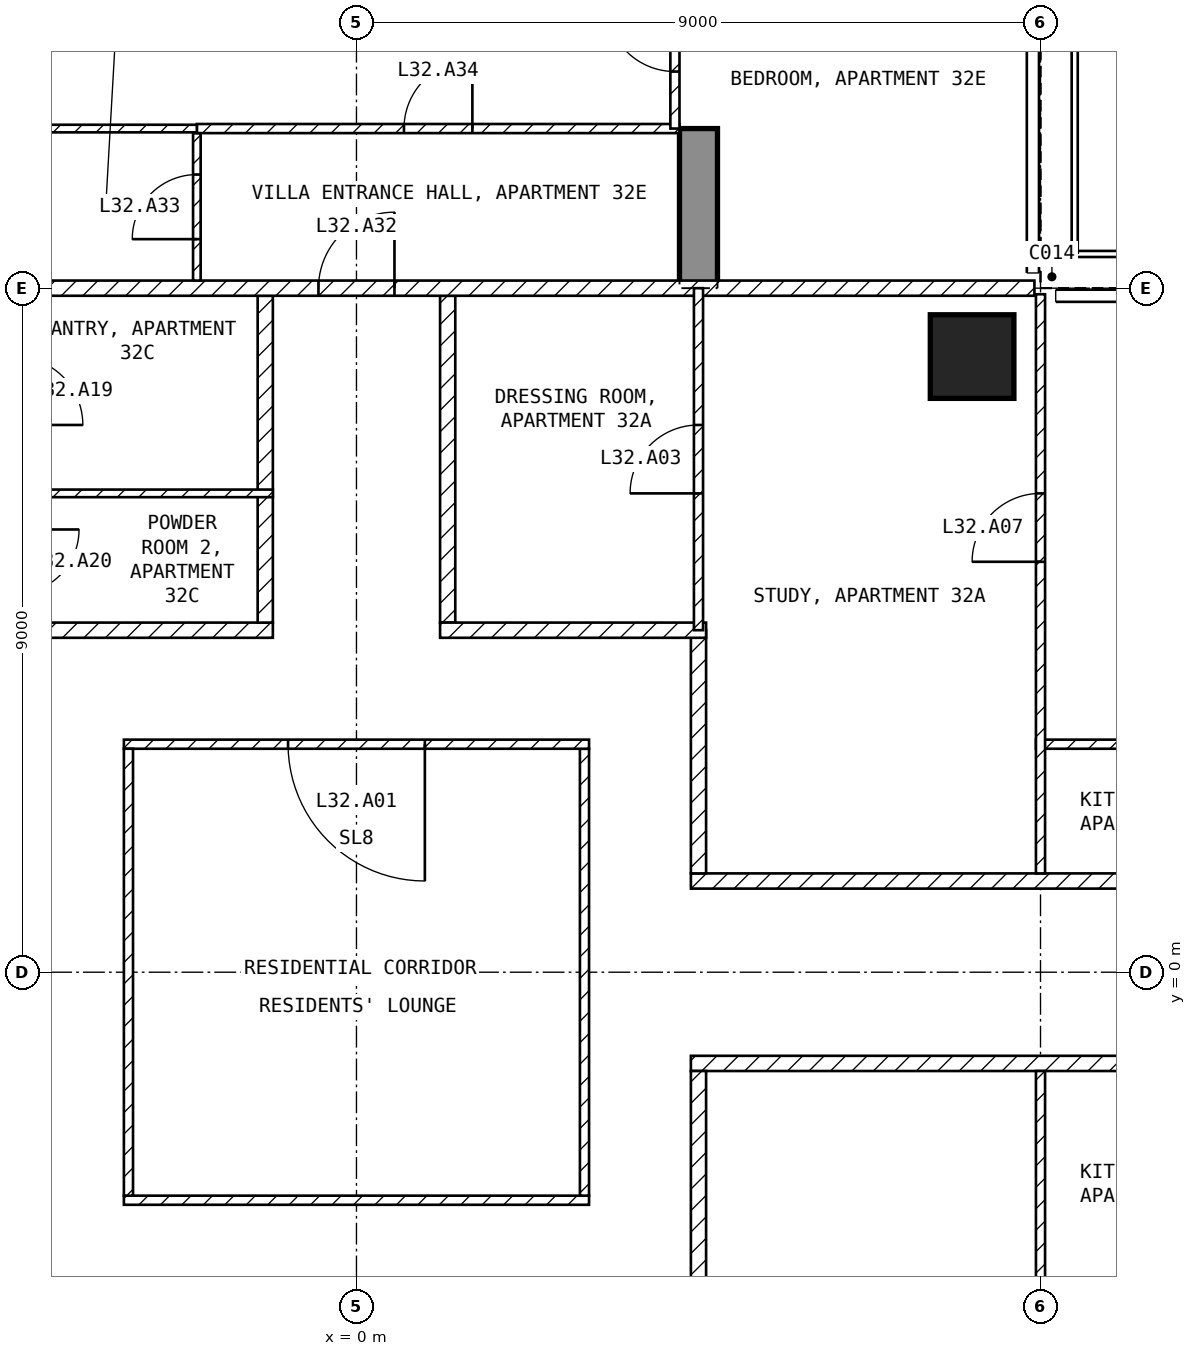
"""IFC4 building model, lengths in metres.
Left out: names, types, materials, properties, quantities, classifications, styles, units other than length and angle.
Written with IfcOpenShell. Run it as: python <this file> out.ifc"""

import sys

from ifc_helpers import new_model, si_unit, direction, frame, frame_2d, origin, origin_2d, place, context, subcontext, project, spatial, polyline, rectangle, outline, extrude, element, fill, save


model = new_model("IFC4")
c1 = context("Model", 3, precision=1e-05, world=origin(), true_north=direction((0.0, 1.0)))
c2 = subcontext(c1, "Body", "Model", "MODEL_VIEW")
j1 = project(units=[si_unit("LENGTHUNIT", "METRE"), si_unit("PLANEANGLEUNIT", "RADIAN")], contexts=[c1])
p1 = place(None, origin())
s1 = spatial("IfcSite", under=j1, at=p1, CompositionType="ELEMENT")
p2 = place(p1, origin())
s2 = spatial("IfcBuilding", under=s1, at=p2, CompositionType="ELEMENT")
p3 = place(p2, frame((0.0, 0.0, 133.9)))
s3 = spatial("IfcBuildingStorey", under=s2, at=p3, CompositionType="ELEMENT", Elevation=133.9)
p4 = place(p3, frame((8.1, 8.1, -0.25), z_axis=(0.0, 0.0, 1.0), x_axis=(1.0, 0.0, 0.0)))
e1 = element("IfcColumn", 1, at=p4, inside=s3, PredefinedType="COLUMN", context=c2, shape_type="SweptSolid", body=[
    extrude(rectangle(XDim=1.1, YDim=1.1, at=origin_2d()), origin(), (0.0, 0.0, 1.0), 3.5),
])
p5 = place(p3, frame((4.25, 9.0, -0.25), z_axis=(1.0, 0.0, 0.0), x_axis=(0.0, 1.0, 0.0)))
e2 = element("IfcWall", 2, at=p5, inside=s3, PredefinedType="SHEAR", context=c2, shape_type="SweptSolid", body=[
    extrude(outline(polyline([(0.0, 0.0), (2.1, 0.0), (2.1, 2.65), (4.5, 2.65), (4.5, 0.0), (9.9, 0.0), (9.9, 2.65), (12.3, 2.65), (12.3, 0.0), (16.55, 0.0), (16.55, 3.5), (0.0, 3.5), (0.0, 0.0)])), origin(), (0.0, 0.0, 1.0), 0.5),
])
p6 = place(p3, frame((-3.06, -3.0, 0.0), z_axis=(0.0, 0.0, 1.0), x_axis=(1.0, 0.0, 0.0)))
e3 = element("IfcWall", 3, at=p6, inside=s3, PredefinedType="PARTITIONING", context=c2, shape_type="SweptSolid", body=[
    extrude(rectangle(XDim=6.12, YDim=0.12, at=frame_2d((3.06, 0.0))), origin(), (0.0, 0.0, 1.0), 3.25),
])
p7 = place(p3, frame((3.0, -2.94, 0.0), z_axis=(0.0, 0.0, 1.0), x_axis=(0.0, 1.0, 0.0)))
e4 = element("IfcWall", 4, at=p7, inside=s3, PredefinedType="PARTITIONING", context=c2, shape_type="SweptSolid", body=[
    extrude(rectangle(XDim=5.88, YDim=0.12, at=frame_2d((2.94, 0.0))), origin(), (0.0, 0.0, 1.0), 3.25),
])
p8 = place(p3, frame((3.06, 3.0, 0.0), z_axis=(0.0, 0.0, 1.0), x_axis=(-1.0, 0.0, 0.0)))
e5 = element("IfcWall", 5, at=p8, inside=s3, PredefinedType="PARTITIONING", context=c2, shape_type="SweptSolid", body=[
    extrude(rectangle(XDim=6.12, YDim=0.12, at=frame_2d((3.06, 0.0))), origin(), (0.0, 0.0, 1.0), 3.25),
])
p9 = place(p8, frame((2.16, 0.0, 0.0)))
e6 = element("IfcOpeningElement", 6, at=p9, cuts=e5, PredefinedType="OPENING", context=c2, shape_type="SweptSolid", body=[
    extrude(rectangle(XDim=1.8, YDim=2.1, at=frame_2d((0.9, 1.05))), frame((0.0, 0.07, 0.0), z_axis=(0.0, -1.0, 0.0), x_axis=(1.0, 0.0, 0.0)), (0.0, 0.0, 1.0), 0.14),
])
p10 = place(p3, frame((-3.0, 2.94, 0.0), z_axis=(0.0, 0.0, 1.0), x_axis=(0.0, -1.0, 0.0)))
e7 = element("IfcWall", 7, at=p10, inside=s3, PredefinedType="PARTITIONING", context=c2, shape_type="SweptSolid", body=[
    extrude(rectangle(XDim=5.88, YDim=0.12, at=frame_2d((2.94, 0.0))), origin(), (0.0, 0.0, 1.0), 3.25),
])
p11 = place(p3, frame((4.4, 1.2, 0.0), z_axis=(0.0, 0.0, 1.0), x_axis=(1.0, 0.0, 0.0)))
e8 = element("IfcWall", 8, at=p11, inside=s3, PredefinedType="PARTITIONING", context=c2, shape_type="SweptSolid", body=[
    extrude(rectangle(XDim=17.2, YDim=0.2, at=frame_2d((8.6, 0.0))), origin(), (0.0, 0.0, 1.0), 3.25),
])
p12 = place(p11, frame((8.3, 0.0, 0.0)))
e9 = element("IfcOpeningElement", 9, at=p12, cuts=e8, PredefinedType="OPENING", context=c2, shape_type="SweptSolid", body=[
    extrude(rectangle(XDim=1.0, YDim=2.1, at=frame_2d((0.5, 1.05))), frame((0.0, 0.11, 0.0), z_axis=(0.0, -1.0, 0.0), x_axis=(1.0, 0.0, 0.0)), (0.0, 0.0, 1.0), 0.22),
])
p13 = place(p3, frame((4.5, 4.5, 0.0), z_axis=(0.0, 0.0, 1.0), x_axis=(0.0, -1.0, 0.0)))
e10 = element("IfcWall", 10, at=p13, inside=s3, PredefinedType="PARTITIONING", context=c2, shape_type="SweptSolid", body=[
    extrude(rectangle(XDim=3.2, YDim=0.2, at=frame_2d((1.6, 0.0))), origin(), (0.0, 0.0, 1.0), 3.25),
])
p14 = place(p3, frame((1.2, 8.9, 0.0), z_axis=(0.0, 0.0, 1.0), x_axis=(0.0, -1.0, 0.0)))
e11 = element("IfcWall", 11, at=p14, inside=s3, PredefinedType="PARTITIONING", context=c2, shape_type="SweptSolid", body=[
    extrude(rectangle(XDim=4.3, YDim=0.2, at=frame_2d((2.15, 0.0))), origin(), (0.0, 0.0, 1.0), 3.25),
])
p15 = place(p3, frame((1.1, 4.5, 0.0), z_axis=(0.0, 0.0, 1.0), x_axis=(1.0, 0.0, 0.0)))
e12 = element("IfcWall", 12, at=p15, inside=s3, PredefinedType="PARTITIONING", context=c2, shape_type="SweptSolid", body=[
    extrude(rectangle(XDim=3.5, YDim=0.2, at=frame_2d((1.75, 0.0))), origin(), (0.0, 0.0, 1.0), 3.25),
])
p16 = place(p3, frame((21.6, -1.2, 0.0), z_axis=(0.0, 0.0, 1.0), x_axis=(-1.0, 0.0, 0.0)))
e13 = element("IfcWall", 13, at=p16, inside=s3, PredefinedType="PARTITIONING", context=c2, shape_type="SweptSolid", body=[
    extrude(rectangle(XDim=17.2, YDim=0.2, at=frame_2d((8.6, 0.0))), origin(), (0.0, 0.0, 1.0), 3.25),
])
p17 = place(p16, frame((7.9, 0.0, 0.0)))
e14 = element("IfcOpeningElement", 14, at=p17, cuts=e13, PredefinedType="OPENING", context=c2, shape_type="SweptSolid", body=[
    extrude(rectangle(XDim=1.0, YDim=2.1, at=frame_2d((0.5, 1.05))), frame((0.0, 0.11, 0.0), z_axis=(0.0, -1.0, 0.0), x_axis=(1.0, 0.0, 0.0)), (0.0, 0.0, 1.0), 0.22),
])
p18 = place(p3, frame((4.5, -1.3, 0.0), z_axis=(0.0, 0.0, 1.0), x_axis=(0.0, -1.0, 0.0)))
e15 = element("IfcWall", 15, at=p18, inside=s3, PredefinedType="PARTITIONING", context=c2, shape_type="SweptSolid", body=[
    extrude(rectangle(XDim=3.2, YDim=0.2, at=frame_2d((1.6, 0.0))), origin(), (0.0, 0.0, 1.0), 3.25),
])
p19 = place(p3, frame((-4.6, 4.5, 0.0), z_axis=(0.0, 0.0, 1.0), x_axis=(1.0, 0.0, 0.0)))
e16 = element("IfcWall", 16, at=p19, inside=s3, PredefinedType="PARTITIONING", context=c2, shape_type="SweptSolid", body=[
    extrude(rectangle(XDim=3.5, YDim=0.2, at=frame_2d((1.75, 0.0))), origin(), (0.0, 0.0, 1.0), 3.25),
])
p20 = place(p3, frame((-1.2, 4.6, 0.0), z_axis=(0.0, 0.0, 1.0), x_axis=(0.0, 1.0, 0.0)))
e17 = element("IfcWall", 17, at=p20, inside=s3, PredefinedType="PARTITIONING", context=c2, shape_type="SweptSolid", body=[
    extrude(rectangle(XDim=4.3, YDim=0.2, at=frame_2d((2.15, 0.0))), origin(), (0.0, 0.0, 1.0), 3.25),
])
p21 = place(p3, frame((-8.92, 9.0, 0.0), z_axis=(0.0, 0.0, 1.0), x_axis=(1.0, 0.0, 0.0)))
e18 = element("IfcWall", 18, at=p21, inside=s3, PredefinedType="PARTITIONING", context=c2, shape_type="SweptSolid", body=[
    extrude(rectangle(XDim=17.84, YDim=0.2, at=frame_2d((8.92, 0.0))), origin(), (0.0, 0.0, 1.0), 3.25),
])
p22 = place(p21, frame((8.42, 0.0, 0.0)))
e19 = element("IfcOpeningElement", 19, at=p22, cuts=e18, PredefinedType="OPENING", context=c2, shape_type="SweptSolid", body=[
    extrude(rectangle(XDim=1.0, YDim=2.1, at=frame_2d((0.5, 1.05))), frame((0.0, 0.11, 0.0), z_axis=(0.0, -1.0, 0.0), x_axis=(1.0, 0.0, 0.0)), (0.0, 0.0, 1.0), 0.22),
])
p23 = place(p3, frame((8.94, 3.0, 0.0), z_axis=(0.0, 0.0, 1.0), x_axis=(1.0, 0.0, 0.0)))
e20 = element("IfcWall", 20, at=p23, inside=s3, PredefinedType="PARTITIONING", context=c2, shape_type="SweptSolid", body=[
    extrude(rectangle(XDim=7.86, YDim=0.12, at=frame_2d((3.93, 0.0))), origin(), (0.0, 0.0, 1.0), 3.25),
])
p24 = place(p23, frame((3.81, 0.0, 0.0)))
e21 = element("IfcOpeningElement", 21, at=p24, cuts=e20, PredefinedType="OPENING", context=c2, shape_type="SweptSolid", body=[
    extrude(rectangle(XDim=0.9, YDim=2.1, at=frame_2d((0.45, 1.05))), frame((0.0, 0.07, 0.0), z_axis=(0.0, -1.0, 0.0), x_axis=(1.0, 0.0, 0.0)), (0.0, 0.0, 1.0), 0.14),
])
p25 = place(p3, frame((9.0, 1.3, 0.0), z_axis=(0.0, 0.0, 1.0), x_axis=(0.0, 1.0, 0.0)))
e22 = element("IfcWall", 22, at=p25, inside=s3, PredefinedType="PARTITIONING", context=c2, shape_type="SweptSolid", body=[
    extrude(rectangle(XDim=7.62, YDim=0.12, at=frame_2d((3.81, 0.0))), origin(), (0.0, 0.0, 1.0), 3.25),
])
p26 = place(p25, frame((4.1, 0.0, 0.0)))
e23 = element("IfcOpeningElement", 23, at=p26, cuts=e22, PredefinedType="OPENING", context=c2, shape_type="SweptSolid", body=[
    extrude(rectangle(XDim=0.9, YDim=2.1, at=frame_2d((0.45, 1.05))), frame((0.0, 0.07, 0.0), z_axis=(0.0, -1.0, 0.0), x_axis=(1.0, 0.0, 0.0)), (0.0, 0.0, 1.0), 0.14),
])
p27 = place(p3, frame((4.5, 4.5, 0.0), z_axis=(0.0, 0.0, 1.0), x_axis=(0.0, 1.0, 0.0)))
e24 = element("IfcWall", 24, at=p27, inside=s3, PredefinedType="PARTITIONING", context=c2, shape_type="SweptSolid", body=[
    extrude(rectangle(XDim=4.5, YDim=0.12, at=frame_2d((2.25, 0.0))), origin(), (0.0, 0.0, 1.0), 3.25),
])
p28 = place(p27, frame((1.8, 0.0, 0.0)))
e25 = element("IfcOpeningElement", 25, at=p28, cuts=e24, PredefinedType="OPENING", context=c2, shape_type="SweptSolid", body=[
    extrude(rectangle(XDim=0.9, YDim=2.1, at=frame_2d((0.45, 1.05))), frame((0.0, 0.07, 0.0), z_axis=(0.0, -1.0, 0.0), x_axis=(1.0, 0.0, 0.0)), (0.0, 0.0, 1.0), 0.14),
])
p29 = place(p3, frame((9.0, -8.92, 0.0), z_axis=(0.0, 0.0, 1.0), x_axis=(0.0, 1.0, 0.0)))
e26 = element("IfcWall", 26, at=p29, inside=s3, PredefinedType="PARTITIONING", context=c2, shape_type="SweptSolid", body=[
    extrude(rectangle(XDim=7.62, YDim=0.12, at=frame_2d((3.81, 0.0))), origin(), (0.0, 0.0, 1.0), 3.25),
])
p30 = place(p29, frame((2.52, 0.0, 0.0)))
e27 = element("IfcOpeningElement", 27, at=p30, cuts=e26, PredefinedType="OPENING", context=c2, shape_type="SweptSolid", body=[
    extrude(rectangle(XDim=0.9, YDim=2.1, at=frame_2d((0.45, 1.05))), frame((0.0, 0.07, 0.0), z_axis=(0.0, -1.0, 0.0), x_axis=(1.0, 0.0, 0.0)), (0.0, 0.0, 1.0), 0.14),
])
p31 = place(p3, frame((-4.56, 6.3, 0.0), z_axis=(0.0, 0.0, 1.0), x_axis=(1.0, 0.0, 0.0)))
e28 = element("IfcWall", 28, at=p31, inside=s3, PredefinedType="PARTITIONING", context=c2, shape_type="SweptSolid", body=[
    extrude(rectangle(XDim=3.46, YDim=0.1, at=frame_2d((1.73, 0.0))), origin(), (0.0, 0.0, 1.0), 3.25),
])
p32 = place(p3, frame((-2.1, 9.1, 0.0), z_axis=(0.0, 0.0, 1.0), x_axis=(0.0, 1.0, 0.0)))
e29 = element("IfcWall", 29, at=p32, inside=s3, PredefinedType="PARTITIONING", context=c2, shape_type="SweptSolid", body=[
    extrude(rectangle(XDim=1.94, YDim=0.1, at=frame_2d((0.97, 0.0))), origin(), (0.0, 0.0, 1.0), 3.25),
])
p33 = place(p32, frame((0.545, 0.0, 0.0)))
e30 = element("IfcOpeningElement", 30, at=p33, cuts=e29, PredefinedType="OPENING", context=c2, shape_type="SweptSolid", body=[
    extrude(rectangle(XDim=0.85, YDim=2.1, at=frame_2d((0.425, 1.05))), frame((0.0, 0.06, 0.0), z_axis=(0.0, -1.0, 0.0), x_axis=(1.0, 0.0, 0.0)), (0.0, 0.0, 1.0), 0.12),
])
p34 = place(p3, frame((-2.1, 11.1, 0.0), z_axis=(0.0, 0.0, 1.0), x_axis=(1.0, 0.0, 0.0)))
e31 = element("IfcWall", 31, at=p34, inside=s3, PredefinedType="PARTITIONING", context=c2, shape_type="SweptSolid", body=[
    extrude(rectangle(XDim=6.35, YDim=0.12, at=frame_2d((3.175, 0.0))), origin(), (0.0, 0.0, 1.0), 3.25),
])
p35 = place(p34, frame((2.725, 0.0, 0.0)))
e32 = element("IfcOpeningElement", 32, at=p35, cuts=e31, PredefinedType="OPENING", context=c2, shape_type="SweptSolid", body=[
    extrude(rectangle(XDim=0.9, YDim=2.1, at=frame_2d((0.45, 1.05))), frame((0.0, 0.07, 0.0), z_axis=(0.0, -1.0, 0.0), x_axis=(1.0, 0.0, 0.0)), (0.0, 0.0, 1.0), 0.14),
])
p36 = place(p3, frame((-4.25, 11.1, 0.0), z_axis=(0.0, 0.0, 1.0), x_axis=(1.0, 0.0, 0.0)))
e33 = element("IfcWall", 33, at=p36, inside=s3, PredefinedType="PARTITIONING", context=c2, shape_type="SweptSolid", body=[
    extrude(rectangle(XDim=2.15, YDim=0.1, at=frame_2d((1.075, 0.0))), origin(), (0.0, 0.0, 1.0), 3.25),
])
p37 = place(p3, frame((4.19, 11.1, 0.0), z_axis=(0.0, 0.0, 1.0), x_axis=(0.0, 1.0, 0.0)))
e34 = element("IfcWall", 34, at=p37, inside=s3, PredefinedType="PARTITIONING", context=c2, shape_type="SweptSolid", body=[
    extrude(rectangle(XDim=2.4, YDim=0.12, at=frame_2d((1.2, 0.0))), origin(), (0.0, 0.0, 1.0), 2.4),
])
p38 = place(p37, frame((0.75, 0.0, 0.0)))
e35 = element("IfcOpeningElement", 35, at=p38, cuts=e34, PredefinedType="OPENING", context=c2, shape_type="SweptSolid", body=[
    extrude(rectangle(XDim=0.9, YDim=2.1, at=frame_2d((0.45, 1.05))), frame((0.0, 0.07, 0.0), z_axis=(0.0, -1.0, 0.0), x_axis=(1.0, 0.0, 0.0)), (0.0, 0.0, 1.0), 0.14),
])
p39 = place(p9, origin())
e36 = element("IfcDoor", 36, at=p39, inside=s3, OperationType="SINGLE_SWING_LEFT", PredefinedType="DOOR", context=c2, shape_type="SweptSolid", body=[
    extrude(rectangle(XDim=1.8, YDim=2.1, at=frame_2d((0.9, 1.05))), frame((0.0, 0.025, 0.0), z_axis=(0.0, -1.0, 0.0), x_axis=(1.0, 0.0, 0.0)), (0.0, 0.0, 1.0), 0.05),
])
fill(e6, e36)
p40 = place(p28, origin())
e37 = element("IfcDoor", 37, at=p40, inside=s3, OperationType="SINGLE_SWING_LEFT", PredefinedType="DOOR", context=c2, shape_type="SweptSolid", body=[
    extrude(rectangle(XDim=0.9, YDim=2.1, at=frame_2d((0.45, 1.05))), frame((0.0, 0.025, 0.0), z_axis=(0.0, -1.0, 0.0), x_axis=(1.0, 0.0, 0.0)), (0.0, 0.0, 1.0), 0.05),
])
fill(e25, e37)
p41 = place(p26, origin())
e38 = element("IfcDoor", 38, at=p41, inside=s3, OperationType="SINGLE_SWING_LEFT", PredefinedType="DOOR", context=c2, shape_type="SweptSolid", body=[
    extrude(rectangle(XDim=0.9, YDim=2.1, at=frame_2d((0.45, 1.05))), frame((0.0, 0.025, 0.0), z_axis=(0.0, -1.0, 0.0), x_axis=(1.0, 0.0, 0.0)), (0.0, 0.0, 1.0), 0.05),
])
fill(e23, e38)
p42 = place(p22, origin())
e39 = element("IfcDoor", 39, at=p42, inside=s3, OperationType="SINGLE_SWING_RIGHT", PredefinedType="DOOR", context=c2, shape_type="SweptSolid", body=[
    extrude(rectangle(XDim=1.0, YDim=2.1, at=frame_2d((0.5, 1.05))), frame((0.0, 0.025, 0.0), z_axis=(0.0, -1.0, 0.0), x_axis=(1.0, 0.0, 0.0)), (0.0, 0.0, 1.0), 0.05),
])
fill(e19, e39)
p43 = place(p33, origin())
e40 = element("IfcDoor", 40, at=p43, inside=s3, OperationType="SINGLE_SWING_LEFT", PredefinedType="DOOR", context=c2, shape_type="SweptSolid", body=[
    extrude(rectangle(XDim=0.85, YDim=2.1, at=frame_2d((0.425, 1.05))), frame((0.0, 0.025, 0.0), z_axis=(0.0, -1.0, 0.0), x_axis=(1.0, 0.0, 0.0)), (0.0, 0.0, 1.0), 0.05),
])
fill(e30, e40)
p44 = place(p35, origin())
e41 = element("IfcDoor", 41, at=p44, inside=s3, OperationType="SINGLE_SWING_RIGHT", PredefinedType="DOOR", context=c2, shape_type="SweptSolid", body=[
    extrude(rectangle(XDim=0.9, YDim=2.1, at=frame_2d((0.45, 1.05))), frame((0.0, 0.025, 0.0), z_axis=(0.0, -1.0, 0.0), x_axis=(1.0, 0.0, 0.0)), (0.0, 0.0, 1.0), 0.05),
])
fill(e32, e41)
p45 = place(p38, origin())
e42 = element("IfcDoor", 42, at=p45, inside=s3, OperationType="SINGLE_SWING_RIGHT", PredefinedType="DOOR", context=c2, shape_type="SweptSolid", body=[
    extrude(rectangle(XDim=0.9, YDim=2.1, at=frame_2d((0.45, 1.05))), frame((0.0, 0.025, 0.0), z_axis=(0.0, -1.0, 0.0), x_axis=(1.0, 0.0, 0.0)), (0.0, 0.0, 1.0), 0.05),
])
fill(e35, e42)
save(model, sys.argv[1])
